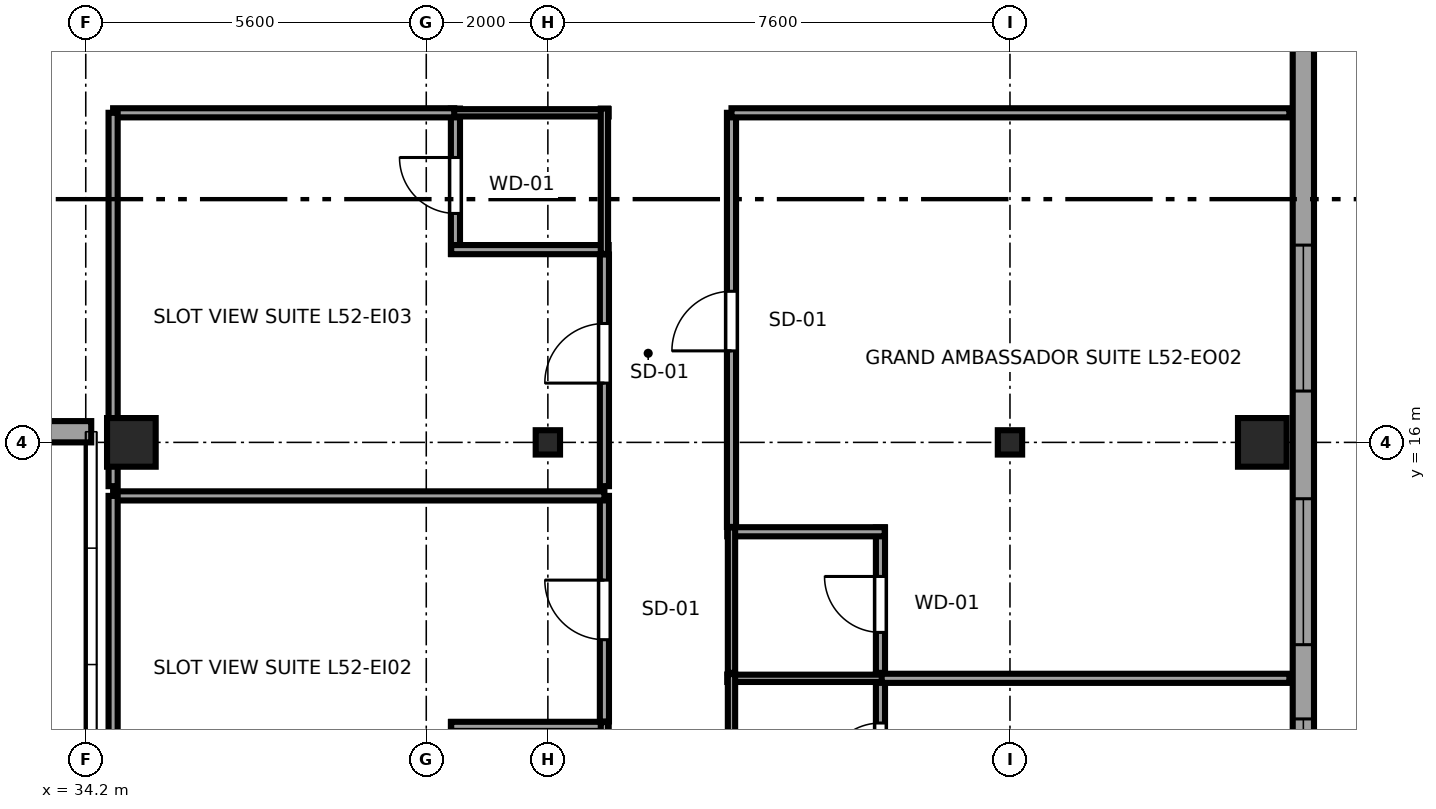
"""IFC4 building model, lengths in metres.
Left out: names, types, materials, properties, quantities, classifications, styles, units other than length and angle.
Written with IfcOpenShell. Run it as: python <this file> out.ifc"""

import sys

from ifc_helpers import new_model, si_unit, direction, frame, frame_2d, origin, origin_2d, place, context, subcontext, project, spatial, rectangle, i_section, extrude, source, transform, mapped, element, fill, save


model = new_model("IFC4")
c1 = context("Model", 3, precision=1e-05, world=origin(), true_north=direction((0.0, 1.0)))
c2 = subcontext(c1, "Body", "Model", "MODEL_VIEW")
j1 = project(units=[si_unit("LENGTHUNIT", "METRE"), si_unit("PLANEANGLEUNIT", "RADIAN")], contexts=[c1])
p1 = place(None, origin())
s1 = spatial("IfcSite", under=j1, at=p1, CompositionType="ELEMENT")
p2 = place(p1, origin())
s2 = spatial("IfcBuilding", under=s1, at=p2, CompositionType="ELEMENT")
p3 = place(p2, frame((0.0, 0.0, 198.2)))
s3 = spatial("IfcBuildingStorey", under=s2, at=p3, CompositionType="ELEMENT", Elevation=198.2)
m1 = source(origin(), c2, "Body", "SweptSolid", [
    extrude(rectangle(XDim=0.8, YDim=0.8, at=origin_2d()), origin(), (0.0, 0.0, 1.0), 3.55),
])
p4 = place(p3, frame((34.95, 16.0, 0.0), z_axis=(0.0, 0.0, 1.0), x_axis=(1.0, 0.0, 0.0)))
e1 = element("IfcColumn", 1, at=p4, inside=s3, PredefinedType="COLUMN", context=c2, shape_type="MappedRepresentation", body=[
    mapped(m1, transform((0.0, 0.0, 0.0), x_axis=(1.0, 0.0, 0.0), y_axis=(0.0, 1.0, 0.0), z_axis=(0.0, 0.0, 1.0), scale=1.0)),
])
m2 = source(origin(), c2, "Body", "SweptSolid", [
    extrude(i_section(OverallWidth=0.4, OverallDepth=0.4, WebThickness=0.02, FlangeThickness=0.035, at=origin_2d()), origin(), (0.0, 0.0, 1.0), 3.55),
])
for number, where, z_axis, x_axis in (
    (2, (41.8, 16.0, 0.0), (0.0, 0.0, 1.0), (1.0, 0.0, 0.0)),
    (3, (49.4, 16.0, 0.0), (0.0, 0.0, 1.0), (1.0, 0.0, 0.0)),
):
    element("IfcColumn", number, at=place(p3, frame(where, z_axis=z_axis, x_axis=x_axis)), inside=s3, PredefinedType="COLUMN", context=c2, shape_type="MappedRepresentation", body=[
        mapped(m2, transform((0.0, 0.0, 0.0), x_axis=(1.0, 0.0, 0.0), y_axis=(0.0, 1.0, 0.0), z_axis=(0.0, 0.0, 1.0), scale=1.0)),
    ])
p5 = place(p3, frame((53.55, 16.0, 0.0), z_axis=(0.0, 0.0, 1.0), x_axis=(1.0, 0.0, 0.0)))
e4 = element("IfcColumn", 4, at=p5, inside=s3, PredefinedType="COLUMN", context=c2, shape_type="MappedRepresentation", body=[
    mapped(m1, transform((0.0, 0.0, 0.0), x_axis=(1.0, 0.0, 0.0), y_axis=(0.0, 1.0, 0.0), z_axis=(0.0, 0.0, 1.0), scale=1.0)),
])
p6 = place(p3, frame((22.71, 16.175, 0.0), z_axis=(0.0, 0.0, 1.0), x_axis=(1.0, 0.0, 0.0)))
e5 = element("IfcWall", 5, at=p6, inside=s3, PredefinedType="SOLIDWALL", context=c2, shape_type="SweptSolid", body=[
    extrude(rectangle(XDim=11.58, YDim=0.35, at=frame_2d((5.79, 0.0))), origin(), (0.0, 0.0, 1.0), 2.758),
])
p7 = place(p6, frame((1.995, 0.0, 0.68)))
e6 = element("IfcOpeningElement", 6, at=p7, cuts=e5, PredefinedType="OPENING", context=c2, shape_type="SweptSolid", body=[
    extrude(rectangle(XDim=2.4, YDim=1.9, at=frame_2d((1.2, 0.95))), frame((0.0, 0.185, 0.0), z_axis=(0.0, -1.0, 0.0), x_axis=(1.0, 0.0, 0.0)), (0.0, 0.0, 1.0), 0.37),
])
p8 = place(p6, frame((7.185, 0.0, 0.68)))
e7 = element("IfcOpeningElement", 7, at=p8, cuts=e5, PredefinedType="OPENING", context=c2, shape_type="SweptSolid", body=[
    extrude(rectangle(XDim=2.4, YDim=1.9, at=frame_2d((1.2, 0.95))), frame((0.0, 0.185, 0.0), z_axis=(0.0, -1.0, 0.0), x_axis=(1.0, 0.0, 0.0)), (0.0, 0.0, 1.0), 0.37),
])
p9 = place(p3, frame((54.225, 7.017, 0.0), z_axis=(0.0, 0.0, 1.0), x_axis=(0.0, 1.0, 0.0)))
e8 = element("IfcWall", 8, at=p9, inside=s3, PredefinedType="SOLIDWALL", context=c2, shape_type="SweptSolid", body=[
    extrude(rectangle(XDim=34.566, YDim=0.35, at=frame_2d((17.283, 0.0))), origin(), (0.0, 0.0, 1.0), 3.37),
])
p10 = place(p9, frame((2.035, 0.0, 0.68)))
e9 = element("IfcOpeningElement", 9, at=p10, cuts=e8, PredefinedType="OPENING", context=c2, shape_type="SweptSolid", body=[
    extrude(rectangle(XDim=2.4, YDim=1.9, at=frame_2d((1.2, 0.95))), frame((0.0, 0.185, 0.0), z_axis=(0.0, -1.0, 0.0), x_axis=(1.0, 0.0, 0.0)), (0.0, 0.0, 1.0), 0.37),
])
p11 = place(p9, frame((5.656, 0.0, 0.68)))
e10 = element("IfcOpeningElement", 10, at=p11, cuts=e8, PredefinedType="OPENING", context=c2, shape_type="SweptSolid", body=[
    extrude(rectangle(XDim=2.4, YDim=1.9, at=frame_2d((1.2, 0.95))), frame((0.0, 0.185, 0.0), z_axis=(0.0, -1.0, 0.0), x_axis=(1.0, 0.0, 0.0)), (0.0, 0.0, 1.0), 0.37),
])
p12 = place(p9, frame((9.827, 0.0, 0.68)))
e11 = element("IfcOpeningElement", 11, at=p12, cuts=e8, PredefinedType="OPENING", context=c2, shape_type="SweptSolid", body=[
    extrude(rectangle(XDim=2.4, YDim=1.9, at=frame_2d((1.2, 0.95))), frame((0.0, 0.185, 0.0), z_axis=(0.0, -1.0, 0.0), x_axis=(1.0, 0.0, 0.0)), (0.0, 0.0, 1.0), 0.37),
])
p13 = place(p9, frame((18.168, 0.0, 0.68)))
e12 = element("IfcOpeningElement", 12, at=p13, cuts=e8, PredefinedType="OPENING", context=c2, shape_type="SweptSolid", body=[
    extrude(rectangle(XDim=2.4, YDim=1.9, at=frame_2d((1.2, 0.95))), frame((0.0, 0.185, 0.0), z_axis=(0.0, -1.0, 0.0), x_axis=(1.0, 0.0, 0.0)), (0.0, 0.0, 1.0), 0.37),
])
p14 = place(p9, frame((27.473, 0.0, 0.62)))
e13 = element("IfcOpeningElement", 13, at=p14, cuts=e8, PredefinedType="OPENING", context=c2, shape_type="SweptSolid", body=[
    extrude(rectangle(XDim=1.5, YDim=1.55, at=frame_2d((0.75, 0.775))), frame((0.0, 0.185, 0.0), z_axis=(0.0, -1.0, 0.0), x_axis=(1.0, 0.0, 0.0)), (0.0, 0.0, 1.0), 0.37),
])
p15 = place(p3, frame((40.28, 9.01, 0.0), z_axis=(0.0, 0.0, 1.0), x_axis=(0.0, 1.0, 0.0)))
e14 = element("IfcWall", 14, at=p15, inside=s3, PredefinedType="PARTITIONING", context=c2, shape_type="SweptSolid", body=[
    extrude(rectangle(XDim=2.39, YDim=0.15, at=frame_2d((1.195, 0.0))), origin(), (0.0, 0.0, 1.0), 3.37),
])
p16 = place(p15, frame((0.665, 0.0, 0.0)))
e15 = element("IfcOpeningElement", 15, at=p16, cuts=e14, PredefinedType="OPENING", context=c2, shape_type="SweptSolid", body=[
    extrude(rectangle(XDim=0.92, YDim=2.01, at=frame_2d((0.46, 1.005))), frame((0.0, 0.085, 0.0), z_axis=(0.0, -1.0, 0.0), x_axis=(1.0, 0.0, 0.0)), (0.0, 0.0, 1.0), 0.17),
])
p17 = place(p3, frame((40.21, 11.33, 0.0), z_axis=(0.0, 0.0, 1.0), x_axis=(1.0, 0.0, 0.0)))
e16 = element("IfcWall", 16, at=p17, inside=s3, PredefinedType="PARTITIONING", context=c2, shape_type="SweptSolid", body=[
    extrude(rectangle(XDim=2.59, YDim=0.15, at=frame_2d((1.295, 0.0))), origin(), (0.0, 0.0, 1.0), 3.37),
])
p18 = place(p3, frame((42.73, 9.01, 0.0), z_axis=(0.0, 0.0, 1.0), x_axis=(0.0, 1.0, 0.0)))
e17 = element("IfcWall", 17, at=p18, inside=s3, PredefinedType="PLUMBINGWALL", context=c2, shape_type="SweptSolid", body=[
    extrude(rectangle(XDim=2.39, YDim=0.12, at=frame_2d((1.195, 0.0))), origin(), (0.0, 0.0, 1.0), 3.37),
])
p19 = place(p3, frame((40.28, 19.1, 0.0), z_axis=(0.0, 0.0, 1.0), x_axis=(0.0, 1.0, 0.0)))
e18 = element("IfcWall", 18, at=p19, inside=s3, PredefinedType="PARTITIONING", context=c2, shape_type="SweptSolid", body=[
    extrude(rectangle(XDim=2.39, YDim=0.15, at=frame_2d((1.195, 0.0))), origin(), (0.0, 0.0, 1.0), 3.37),
])
p20 = place(p19, frame((0.665, 0.0, 0.0)))
e19 = element("IfcOpeningElement", 19, at=p20, cuts=e18, PredefinedType="OPENING", context=c2, shape_type="SweptSolid", body=[
    extrude(rectangle(XDim=0.92, YDim=2.01, at=frame_2d((0.46, 1.005))), frame((0.0, 0.085, 0.0), z_axis=(0.0, -1.0, 0.0), x_axis=(1.0, 0.0, 0.0)), (0.0, 0.0, 1.0), 0.17),
])
p21 = place(p3, frame((40.21, 19.17, 0.0), z_axis=(0.0, 0.0, 1.0), x_axis=(1.0, 0.0, 0.0)))
e20 = element("IfcWall", 20, at=p21, inside=s3, PredefinedType="PARTITIONING", context=c2, shape_type="SweptSolid", body=[
    extrude(rectangle(XDim=2.59, YDim=0.15, at=frame_2d((1.295, 0.0))), origin(), (0.0, 0.0, 1.0), 3.37),
])
p22 = place(p3, frame((40.21, 21.42, 0.0), z_axis=(0.0, 0.0, 1.0), x_axis=(1.0, 0.0, 0.0)))
e21 = element("IfcWall", 21, at=p22, inside=s3, PredefinedType="PLUMBINGWALL", context=c2, shape_type="SweptSolid", body=[
    extrude(rectangle(XDim=2.59, YDim=0.12, at=frame_2d((1.295, 0.0))), origin(), (0.0, 0.0, 1.0), 3.37),
])
p23 = place(p3, frame((42.73, 19.1, 0.0), z_axis=(0.0, 0.0, 1.0), x_axis=(0.0, 1.0, 0.0)))
e22 = element("IfcWall", 22, at=p23, inside=s3, PredefinedType="PLUMBINGWALL", context=c2, shape_type="SweptSolid", body=[
    extrude(rectangle(XDim=2.39, YDim=0.12, at=frame_2d((1.195, 0.0))), origin(), (0.0, 0.0, 1.0), 3.37),
])
p24 = place(p3, frame((47.27, 9.8, 0.0), z_axis=(0.0, 0.0, 1.0), x_axis=(0.0, 1.0, 0.0)))
e23 = element("IfcWall", 23, at=p24, inside=s3, PredefinedType="PARTITIONING", context=c2, shape_type="SweptSolid", body=[
    extrude(rectangle(XDim=2.39, YDim=0.15, at=frame_2d((1.195, 0.0))), origin(), (0.0, 0.0, 1.0), 3.37),
])
p25 = place(p24, frame((0.665, 0.0, 0.0)))
e24 = element("IfcOpeningElement", 24, at=p25, cuts=e23, PredefinedType="OPENING", context=c2, shape_type="SweptSolid", body=[
    extrude(rectangle(XDim=0.92, YDim=2.01, at=frame_2d((0.46, 1.005))), frame((0.0, 0.085, 0.0), z_axis=(0.0, -1.0, 0.0), x_axis=(1.0, 0.0, 0.0)), (0.0, 0.0, 1.0), 0.17),
])
p26 = place(p3, frame((44.75, 12.12, 0.0), z_axis=(0.0, 0.0, 1.0), x_axis=(1.0, 0.0, 0.0)))
e25 = element("IfcWall", 25, at=p26, inside=s3, PredefinedType="PLUMBINGWALL", context=c2, shape_type="SweptSolid", body=[
    extrude(rectangle(XDim=2.59, YDim=0.12, at=frame_2d((1.295, 0.0))), origin(), (0.0, 0.0, 1.0), 3.37),
])
p27 = place(p3, frame((44.82, 9.8, 0.0), z_axis=(0.0, 0.0, 1.0), x_axis=(0.0, 1.0, 0.0)))
e26 = element("IfcWall", 26, at=p27, inside=s3, PredefinedType="PLUMBINGWALL", context=c2, shape_type="SweptSolid", body=[
    extrude(rectangle(XDim=2.39, YDim=0.12, at=frame_2d((1.195, 0.0))), origin(), (0.0, 0.0, 1.0), 3.37),
])
p28 = place(p3, frame((47.27, 12.21, 0.0), z_axis=(0.0, 0.0, 1.0), x_axis=(0.0, 1.0, 0.0)))
e27 = element("IfcWall", 27, at=p28, inside=s3, PredefinedType="PARTITIONING", context=c2, shape_type="SweptSolid", body=[
    extrude(rectangle(XDim=2.39, YDim=0.15, at=frame_2d((1.195, 0.0))), origin(), (0.0, 0.0, 1.0), 3.37),
])
p29 = place(p28, frame((0.665, 0.0, 0.0)))
e28 = element("IfcOpeningElement", 28, at=p29, cuts=e27, PredefinedType="OPENING", context=c2, shape_type="SweptSolid", body=[
    extrude(rectangle(XDim=0.92, YDim=2.01, at=frame_2d((0.46, 1.005))), frame((0.0, 0.085, 0.0), z_axis=(0.0, -1.0, 0.0), x_axis=(1.0, 0.0, 0.0)), (0.0, 0.0, 1.0), 0.17),
])
p30 = place(p3, frame((44.75, 14.53, 0.0), z_axis=(0.0, 0.0, 1.0), x_axis=(1.0, 0.0, 0.0)))
e29 = element("IfcWall", 29, at=p30, inside=s3, PredefinedType="PARTITIONING", context=c2, shape_type="SweptSolid", body=[
    extrude(rectangle(XDim=2.59, YDim=0.15, at=frame_2d((1.295, 0.0))), origin(), (0.0, 0.0, 1.0), 3.37),
])
p31 = place(p3, frame((44.82, 12.21, 0.0), z_axis=(0.0, 0.0, 1.0), x_axis=(0.0, 1.0, 0.0)))
e30 = element("IfcWall", 30, at=p31, inside=s3, PredefinedType="PLUMBINGWALL", context=c2, shape_type="SweptSolid", body=[
    extrude(rectangle(XDim=2.39, YDim=0.12, at=frame_2d((1.195, 0.0))), origin(), (0.0, 0.0, 1.0), 3.37),
])
p32 = place(p3, frame((42.73, 11.41, 0.0), z_axis=(0.0, 0.0, 1.0), x_axis=(0.0, 1.0, 0.0)))
e31 = element("IfcWall", 31, at=p32, inside=s3, PredefinedType="PARTITIONING", context=c2, shape_type="SweptSolid", body=[
    extrude(rectangle(XDim=3.71, YDim=0.15, at=frame_2d((1.855, 0.0))), origin(), (0.0, 0.0, 1.0), 3.37),
])
p33 = place(p32, frame((1.345, 0.0, 0.0)))
e32 = element("IfcOpeningElement", 32, at=p33, cuts=e31, PredefinedType="OPENING", context=c2, shape_type="SweptSolid", body=[
    extrude(rectangle(XDim=0.98, YDim=2.12, at=frame_2d((0.49, 1.06))), frame((0.0, 0.085, 0.0), z_axis=(0.0, -1.0, 0.0), x_axis=(1.0, 0.0, 0.0)), (0.0, 0.0, 1.0), 0.17),
])
p34 = place(p3, frame((34.65, 15.12, 0.0), z_axis=(0.0, 0.0, 1.0), x_axis=(1.0, 0.0, 0.0)))
e33 = element("IfcWall", 33, at=p34, inside=s3, PredefinedType="PARTITIONING", context=c2, shape_type="SweptSolid", body=[
    extrude(rectangle(XDim=8.08, YDim=0.15, at=frame_2d((4.04, 0.0))), origin(), (0.0, 0.0, 1.0), 3.37),
])
p35 = place(p3, frame((34.65, 9.08, 0.0), z_axis=(0.0, 0.0, 1.0), x_axis=(0.0, 1.0, 0.0)))
e34 = element("IfcWall", 34, at=p35, inside=s3, PredefinedType="PARTITIONING", context=c2, shape_type="SweptSolid", body=[
    extrude(rectangle(XDim=6.04, YDim=0.15, at=frame_2d((3.02, 0.0))), origin(), (0.0, 0.0, 1.0), 3.37),
])
p36 = place(p3, frame((42.73, 15.28, 0.0), z_axis=(0.0, 0.0, 1.0), x_axis=(0.0, 1.0, 0.0)))
e35 = element("IfcWall", 35, at=p36, inside=s3, PredefinedType="PARTITIONING", context=c2, shape_type="SweptSolid", body=[
    extrude(rectangle(XDim=3.81, YDim=0.15, at=frame_2d((1.905, 0.0))), origin(), (0.0, 0.0, 1.0), 3.37),
])
p37 = place(p36, frame((1.695, 0.0, 0.0)))
e36 = element("IfcOpeningElement", 36, at=p37, cuts=e35, PredefinedType="OPENING", context=c2, shape_type="SweptSolid", body=[
    extrude(rectangle(XDim=0.98, YDim=2.12, at=frame_2d((0.49, 1.06))), frame((0.0, 0.085, 0.0), z_axis=(0.0, -1.0, 0.0), x_axis=(1.0, 0.0, 0.0)), (0.0, 0.0, 1.0), 0.17),
])
p38 = place(p3, frame((34.65, 21.42, 0.0), z_axis=(0.0, 0.0, 1.0), x_axis=(1.0, 0.0, 0.0)))
e37 = element("IfcWall", 37, at=p38, inside=s3, PredefinedType="PARTITIONING", context=c2, shape_type="SweptSolid", body=[
    extrude(rectangle(XDim=5.61, YDim=0.15, at=frame_2d((2.805, 0.0))), origin(), (0.0, 0.0, 1.0), 3.37),
])
p39 = place(p3, frame((34.65, 15.28, 0.0), z_axis=(0.0, 0.0, 1.0), x_axis=(0.0, 1.0, 0.0)))
e38 = element("IfcWall", 38, at=p39, inside=s3, PredefinedType="PARTITIONING", context=c2, shape_type="SweptSolid", body=[
    extrude(rectangle(XDim=6.14, YDim=0.15, at=frame_2d((3.07, 0.0))), origin(), (0.0, 0.0, 1.0), 3.37),
])
p40 = place(p3, frame((47.29, 12.12, 0.0), z_axis=(0.0, 0.0, 1.0), x_axis=(1.0, 0.0, 0.0)))
e39 = element("IfcWall", 39, at=p40, inside=s3, PredefinedType="PARTITIONING", context=c2, shape_type="SweptSolid", body=[
    extrude(rectangle(XDim=6.705, YDim=0.15, at=frame_2d((3.353, 0.0))), origin(), (0.0, 0.0, 1.0), 3.37),
])
p41 = place(p3, frame((44.82, 14.61, 0.0), z_axis=(0.0, 0.0, 1.0), x_axis=(0.0, 1.0, 0.0)))
e40 = element("IfcWall", 40, at=p41, inside=s3, PredefinedType="PARTITIONING", context=c2, shape_type="SweptSolid", body=[
    extrude(rectangle(XDim=6.81, YDim=0.15, at=frame_2d((3.405, 0.0))), origin(), (0.0, 0.0, 1.0), 3.37),
])
p42 = place(p41, frame((2.895, 0.0, 0.0)))
e41 = element("IfcOpeningElement", 41, at=p42, cuts=e40, PredefinedType="OPENING", context=c2, shape_type="SweptSolid", body=[
    extrude(rectangle(XDim=0.98, YDim=2.12, at=frame_2d((0.49, 1.06))), frame((0.0, 0.085, 0.0), z_axis=(0.0, -1.0, 0.0), x_axis=(1.0, 0.0, 0.0)), (0.0, 0.0, 1.0), 0.17),
])
p43 = place(p3, frame((44.82, 21.42, 0.0), z_axis=(0.0, 0.0, 1.0), x_axis=(1.0, 0.0, 0.0)))
e42 = element("IfcWall", 42, at=p43, inside=s3, PredefinedType="PARTITIONING", context=c2, shape_type="SweptSolid", body=[
    extrude(rectangle(XDim=9.175, YDim=0.15, at=frame_2d((4.587, 0.0))), origin(), (0.0, 0.0, 1.0), 3.37),
])
m3 = source(origin(), c2, "Body", "SweptSolid", [
    extrude(rectangle(XDim=2.4, YDim=1.9, at=frame_2d((1.2, 0.95))), frame((0.0, 0.09, 0.0), z_axis=(0.0, -1.0, 0.0), x_axis=(1.0, 0.0, 0.0)), (0.0, 0.0, 1.0), 0.06),
])
p44 = place(p10, origin())
e43 = element("IfcWindow", 43, at=p44, inside=s3, PartitioningType="TRIPLE_PANEL_HORIZONTAL", PredefinedType="WINDOW", context=c2, shape_type="MappedRepresentation", body=[
    mapped(m3, transform((0.0, 0.0, 0.0), x_axis=(1.0, 0.0, 0.0), y_axis=(0.0, 1.0, 0.0), z_axis=(0.0, 0.0, 1.0), scale=1.0)),
])
fill(e9, e43)
p45 = place(p11, origin())
e44 = element("IfcWindow", 44, at=p45, inside=s3, PartitioningType="TRIPLE_PANEL_HORIZONTAL", PredefinedType="WINDOW", context=c2, shape_type="MappedRepresentation", body=[
    mapped(m3, transform((0.0, 0.0, 0.0), x_axis=(1.0, 0.0, 0.0), y_axis=(0.0, 1.0, 0.0), z_axis=(0.0, 0.0, 1.0), scale=1.0)),
])
fill(e10, e44)
p46 = place(p12, origin())
e45 = element("IfcWindow", 45, at=p46, inside=s3, PartitioningType="TRIPLE_PANEL_HORIZONTAL", PredefinedType="WINDOW", context=c2, shape_type="MappedRepresentation", body=[
    mapped(m3, transform((0.0, 0.0, 0.0), x_axis=(1.0, 0.0, 0.0), y_axis=(0.0, 1.0, 0.0), z_axis=(0.0, 0.0, 1.0), scale=1.0)),
])
fill(e11, e45)
m4 = source(origin(), c2, "Body", "SweptSolid", [
    extrude(rectangle(XDim=0.92, YDim=2.01, at=frame_2d((0.46, 1.005))), frame((0.0, 0.025, 0.0), z_axis=(0.0, -1.0, 0.0), x_axis=(1.0, 0.0, 0.0)), (0.0, 0.0, 1.0), 0.05),
])
p47 = place(p20, origin())
e46 = element("IfcDoor", 46, at=p47, inside=s3, OperationType="SINGLE_SWING_RIGHT", PredefinedType="DOOR", context=c2, shape_type="MappedRepresentation", body=[
    mapped(m4, transform((0.0, 0.0, 0.0), x_axis=(1.0, 0.0, 0.0), y_axis=(0.0, 1.0, 0.0), z_axis=(0.0, 0.0, 1.0), scale=1.0)),
])
fill(e19, e46)
p48 = place(p25, origin())
e47 = element("IfcDoor", 47, at=p48, inside=s3, OperationType="SINGLE_SWING_LEFT", PredefinedType="DOOR", context=c2, shape_type="MappedRepresentation", body=[
    mapped(m4, transform((0.0, 0.0, 0.0), x_axis=(1.0, 0.0, 0.0), y_axis=(0.0, 1.0, 0.0), z_axis=(0.0, 0.0, 1.0), scale=1.0)),
])
fill(e24, e47)
p49 = place(p29, origin())
e48 = element("IfcDoor", 48, at=p49, inside=s3, OperationType="SINGLE_SWING_RIGHT", PredefinedType="DOOR", context=c2, shape_type="MappedRepresentation", body=[
    mapped(m4, transform((0.0, 0.0, 0.0), x_axis=(1.0, 0.0, 0.0), y_axis=(0.0, 1.0, 0.0), z_axis=(0.0, 0.0, 1.0), scale=1.0)),
])
fill(e28, e48)
m5 = source(origin(), c2, "Body", "SweptSolid", [
    extrude(rectangle(XDim=0.98, YDim=2.12, at=frame_2d((0.49, 1.06))), frame((0.0, 0.025, 0.0), z_axis=(0.0, -1.0, 0.0), x_axis=(1.0, 0.0, 0.0)), (0.0, 0.0, 1.0), 0.05),
])
p50 = place(p33, origin())
e49 = element("IfcDoor", 49, at=p50, inside=s3, OperationType="SINGLE_SWING_RIGHT", PredefinedType="DOOR", context=c2, shape_type="MappedRepresentation", body=[
    mapped(m5, transform((0.0, 0.0, 0.0), x_axis=(1.0, 0.0, 0.0), y_axis=(0.0, 1.0, 0.0), z_axis=(0.0, 0.0, 1.0), scale=1.0)),
])
fill(e32, e49)
p51 = place(p37, origin())
e50 = element("IfcDoor", 50, at=p51, inside=s3, OperationType="SINGLE_SWING_LEFT", PredefinedType="DOOR", context=c2, shape_type="MappedRepresentation", body=[
    mapped(m5, transform((0.0, 0.0, 0.0), x_axis=(1.0, 0.0, 0.0), y_axis=(0.0, 1.0, 0.0), z_axis=(0.0, 0.0, 1.0), scale=1.0)),
])
fill(e36, e50)
p52 = place(p42, origin())
e51 = element("IfcDoor", 51, at=p52, inside=s3, OperationType="SINGLE_SWING_LEFT", PredefinedType="DOOR", context=c2, shape_type="MappedRepresentation", body=[
    mapped(m5, transform((0.0, 0.0, 0.0), x_axis=(1.0, 0.0, 0.0), y_axis=(0.0, 1.0, 0.0), z_axis=(0.0, 0.0, 1.0), scale=1.0)),
])
fill(e41, e51)
save(model, sys.argv[1])
